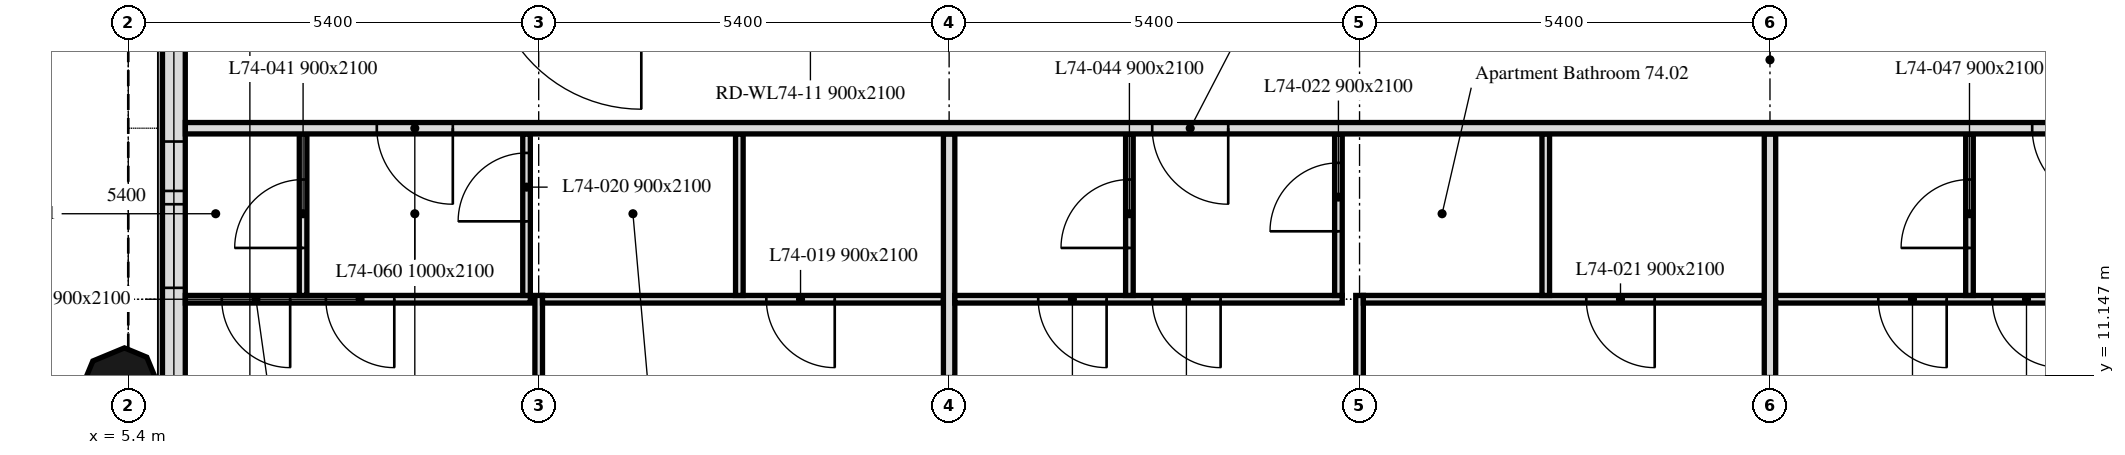
"""IFC4 building model, lengths in metres.
Left out: names, types, materials, properties, quantities, classifications, styles, units other than length and angle.
Written with IfcOpenShell. Run it as: python <this file> out.ifc"""

import sys

from ifc_helpers import new_model, si_unit, direction, frame, frame_2d, origin, place, context, subcontext, project, spatial, polyline, rectangle, outline, extrude, element, fill, save


model = new_model("IFC4")
c1 = context("Model", 3, precision=1e-05, world=origin(), true_north=direction((0.0, 1.0)))
c2 = subcontext(c1, "Body", "Model", "MODEL_VIEW")
j1 = project(units=[si_unit("LENGTHUNIT", "METRE"), si_unit("PLANEANGLEUNIT", "RADIAN")], contexts=[c1])
p1 = place(None, origin())
s1 = spatial("IfcSite", under=j1, at=p1, CompositionType="ELEMENT")
p2 = place(p1, origin())
s2 = spatial("IfcBuilding", under=s1, at=p2, CompositionType="ELEMENT")
p3 = place(p2, frame((0.0, 0.0, 298.3)))
s3 = spatial("IfcBuildingStorey", under=s2, at=p3, CompositionType="ELEMENT", Elevation=298.3)
p4 = place(p3, frame((5.4, 10.8, 0.0), z_axis=(0.0, 0.0, 1.0), x_axis=(-0.382683432365, 0.923879532511, 0.0)))
e1 = element("IfcColumn", 1, at=p4, inside=s3, PredefinedType="COLUMN", context=c2, shape_type="SweptSolid", body=[
    extrude(outline(polyline([(-0.45, -0.45), (0.45, -0.45), (0.675, -0.225), (0.675, 0.225), (0.45, 0.45), (-0.45, 0.45), (-0.675, 0.225), (-0.675, -0.225), (-0.45, -0.45)])), origin(), (0.0, 0.0, 1.0), 3.0),
])
p5 = place(p3, frame((6.0, 16.2, 0.0), z_axis=(0.0, 0.0, 1.0), x_axis=(0.0, -1.0, 0.0)))
e2 = element("IfcWall", 2, at=p5, inside=s3, PredefinedType="SOLIDWALL", context=c2, shape_type="SweptSolid", body=[
    extrude(rectangle(XDim=5.214, YDim=0.3, at=frame_2d((2.607, 0.0))), origin(), (0.0, 0.0, 1.0), 3.0),
])
p6 = place(p5, frame((1.975, 0.0, 0.9)))
e3 = element("IfcOpeningElement", 3, at=p6, cuts=e2, PredefinedType="OPENING", context=c2, shape_type="SweptSolid", body=[
    extrude(rectangle(XDim=0.65, YDim=1.7, at=frame_2d((0.325, 0.85))), frame((0.0, 0.16, 0.0), z_axis=(0.0, -1.0, 0.0), x_axis=(1.0, 0.0, 0.0)), (0.0, 0.0, 1.0), 0.32),
])
p7 = place(p5, frame((2.8, 0.0, 0.9)))
e4 = element("IfcOpeningElement", 4, at=p7, cuts=e2, PredefinedType="OPENING", context=c2, shape_type="SweptSolid", body=[
    extrude(rectangle(XDim=1.1, YDim=1.7, at=frame_2d((0.55, 0.85))), frame((0.0, 0.16, 0.0), z_axis=(0.0, -1.0, 0.0), x_axis=(1.0, 0.0, 0.0)), (0.0, 0.0, 1.0), 0.32),
])
p8 = place(p3, frame((10.8, 11.12, 0.0), z_axis=(0.0, 0.0, 1.0), x_axis=(0.0, 1.0, 0.0)))
e5 = element("IfcWall", 5, at=p8, inside=s3, PredefinedType="PARTITIONING", context=c2, shape_type="SweptSolid", body=[
    extrude(rectangle(XDim=1.08, YDim=0.1, at=frame_2d((0.54, 0.0))), origin(), (0.0, 0.0, 1.0), 3.0),
])
p9 = place(p3, frame((10.69, 12.15, 0.0), z_axis=(0.0, 0.0, 1.0), x_axis=(-1.0, 0.0, 0.0)))
e6 = element("IfcWall", 6, at=p9, inside=s3, PredefinedType="PARTITIONING", context=c2, shape_type="SweptSolid", body=[
    extrude(rectangle(XDim=4.539, YDim=0.1, at=frame_2d((2.27, 0.0))), origin(), (0.0, 0.0, 1.0), 3.0),
])
p10 = place(p9, frame((3.16, 0.0, 0.0)))
e7 = element("IfcOpeningElement", 7, at=p10, cuts=e6, PredefinedType="OPENING", context=c2, shape_type="SweptSolid", body=[
    extrude(rectangle(XDim=0.9, YDim=2.1, at=frame_2d((0.45, 1.05))), frame((0.0, 0.05, 0.0), z_axis=(0.0, -1.0, 0.0), x_axis=(1.0, 0.0, 0.0)), (0.0, 0.0, 1.0), 0.1),
])
p11 = place(p9, frame((1.79, 0.0, 0.0)))
e8 = element("IfcOpeningElement", 8, at=p11, cuts=e6, PredefinedType="OPENING", context=c2, shape_type="SweptSolid", body=[
    extrude(rectangle(XDim=0.9, YDim=2.1, at=frame_2d((0.45, 1.05))), frame((0.0, 0.05, 0.0), z_axis=(0.0, -1.0, 0.0), x_axis=(1.0, 0.0, 0.0)), (0.0, 0.0, 1.0), 0.1),
])
p12 = place(p3, frame((16.125, 12.15, 0.0), z_axis=(0.0, 0.0, 1.0), x_axis=(-1.0, 0.0, 0.0)))
e9 = element("IfcWall", 9, at=p12, inside=s3, PredefinedType="PARTITIONING", context=c2, shape_type="SweptSolid", body=[
    extrude(rectangle(XDim=5.275, YDim=0.1, at=frame_2d((2.637, 0.0))), origin(), (0.0, 0.0, 1.0), 3.0),
])
p13 = place(p12, frame((1.43, 0.0, 0.0)))
e10 = element("IfcOpeningElement", 10, at=p13, cuts=e9, PredefinedType="OPENING", context=c2, shape_type="SweptSolid", body=[
    extrude(rectangle(XDim=0.9, YDim=2.1, at=frame_2d((0.45, 1.05))), frame((0.0, 0.05, 0.0), z_axis=(0.0, -1.0, 0.0), x_axis=(1.0, 0.0, 0.0)), (0.0, 0.0, 1.0), 0.1),
])
p14 = place(p3, frame((7.7, 12.2, 0.0), z_axis=(0.0, 0.0, 1.0), x_axis=(0.0, 1.0, 0.0)))
e11 = element("IfcWall", 11, at=p14, inside=s3, PredefinedType="PARTITIONING", context=c2, shape_type="SweptSolid", body=[
    extrude(rectangle(XDim=2.125, YDim=0.1, at=frame_2d((1.062, 0.0))), origin(), (0.0, 0.0, 1.0), 3.0),
])
p15 = place(p14, frame((0.625, 0.0, 0.0)))
e12 = element("IfcOpeningElement", 12, at=p15, cuts=e11, PredefinedType="OPENING", context=c2, shape_type="SweptSolid", body=[
    extrude(rectangle(XDim=0.9, YDim=2.1, at=frame_2d((0.45, 1.05))), frame((0.0, 0.05, 0.0), z_axis=(0.0, -1.0, 0.0), x_axis=(1.0, 0.0, 0.0)), (0.0, 0.0, 1.0), 0.1),
])
p16 = place(p3, frame((10.64, 12.2, 0.0), z_axis=(0.0, 0.0, 1.0), x_axis=(0.0, 1.0, 0.0)))
e13 = element("IfcWall", 13, at=p16, inside=s3, PredefinedType="PARTITIONING", context=c2, shape_type="SweptSolid", body=[
    extrude(rectangle(XDim=2.125, YDim=0.1, at=frame_2d((1.062, 0.0))), origin(), (0.0, 0.0, 1.0), 3.0),
])
p17 = place(p16, frame((0.975, 0.0, 0.0)))
e14 = element("IfcOpeningElement", 14, at=p17, cuts=e13, PredefinedType="OPENING", context=c2, shape_type="SweptSolid", body=[
    extrude(rectangle(XDim=0.9, YDim=2.1, at=frame_2d((0.45, 1.05))), frame((0.0, 0.05, 0.0), z_axis=(0.0, -1.0, 0.0), x_axis=(1.0, 0.0, 0.0)), (0.0, 0.0, 1.0), 0.1),
])
p18 = place(p3, frame((13.44, 12.2, 0.0), z_axis=(0.0, 0.0, 1.0), x_axis=(0.0, 1.0, 0.0)))
e15 = element("IfcWall", 15, at=p18, inside=s3, PredefinedType="PARTITIONING", context=c2, shape_type="SweptSolid", body=[
    extrude(rectangle(XDim=2.125, YDim=0.1, at=frame_2d((1.062, 0.0))), origin(), (0.0, 0.0, 1.0), 3.0),
])
p19 = place(p3, frame((16.2, 11.12, 0.0), z_axis=(0.0, 0.0, 1.0), x_axis=(0.0, 1.0, 0.0)))
e16 = element("IfcWall", 16, at=p19, inside=s3, PredefinedType="PARTITIONING", context=c2, shape_type="SweptSolid", body=[
    extrude(rectangle(XDim=3.205, YDim=0.15, at=frame_2d((1.603, 0.0))), origin(), (0.0, 0.0, 1.0), 3.0),
])
p20 = place(p3, frame((21.6, 11.12, 0.0), z_axis=(0.0, 0.0, 1.0), x_axis=(0.0, 1.0, 0.0)))
e17 = element("IfcWall", 17, at=p20, inside=s3, PredefinedType="PARTITIONING", context=c2, shape_type="SweptSolid", body=[
    extrude(rectangle(XDim=1.08, YDim=0.1, at=frame_2d((0.54, 0.0))), origin(), (0.0, 0.0, 1.0), 3.0),
])
p21 = place(p3, frame((21.372, 12.15, 0.0), z_axis=(0.0, 0.0, 1.0), x_axis=(-1.0, 0.0, 0.0)))
e18 = element("IfcWall", 18, at=p21, inside=s3, PredefinedType="PARTITIONING", context=c2, shape_type="SweptSolid", body=[
    extrude(rectangle(XDim=5.097, YDim=0.1, at=frame_2d((2.549, 0.0))), origin(), (0.0, 0.0, 1.0), 3.0),
])
p22 = place(p21, frame((3.1, 0.0, 0.0)))
e19 = element("IfcOpeningElement", 19, at=p22, cuts=e18, PredefinedType="OPENING", context=c2, shape_type="SweptSolid", body=[
    extrude(rectangle(XDim=0.9, YDim=2.1, at=frame_2d((0.45, 1.05))), frame((0.0, 0.05, 0.0), z_axis=(0.0, -1.0, 0.0), x_axis=(1.0, 0.0, 0.0)), (0.0, 0.0, 1.0), 0.1),
])
p23 = place(p21, frame((1.6, 0.0, 0.0)))
e20 = element("IfcOpeningElement", 20, at=p23, cuts=e18, PredefinedType="OPENING", context=c2, shape_type="SweptSolid", body=[
    extrude(rectangle(XDim=0.9, YDim=2.1, at=frame_2d((0.45, 1.05))), frame((0.0, 0.05, 0.0), z_axis=(0.0, -1.0, 0.0), x_axis=(1.0, 0.0, 0.0)), (0.0, 0.0, 1.0), 0.1),
])
p24 = place(p3, frame((26.925, 12.15, 0.0), z_axis=(0.0, 0.0, 1.0), x_axis=(-1.0, 0.0, 0.0)))
e21 = element("IfcWall", 21, at=p24, inside=s3, PredefinedType="PARTITIONING", context=c2, shape_type="SweptSolid", body=[
    extrude(rectangle(XDim=5.275, YDim=0.1, at=frame_2d((2.638, 0.0))), origin(), (0.0, 0.0, 1.0), 3.0),
])
p25 = place(p24, frame((1.442, 0.0, 0.0)))
e22 = element("IfcOpeningElement", 22, at=p25, cuts=e21, PredefinedType="OPENING", context=c2, shape_type="SweptSolid", body=[
    extrude(rectangle(XDim=0.9, YDim=2.1, at=frame_2d((0.45, 1.05))), frame((0.0, 0.05, 0.0), z_axis=(0.0, -1.0, 0.0), x_axis=(1.0, 0.0, 0.0)), (0.0, 0.0, 1.0), 0.1),
])
p26 = place(p3, frame((18.572, 12.2, 0.0), z_axis=(0.0, 0.0, 1.0), x_axis=(0.0, 1.0, 0.0)))
e23 = element("IfcWall", 23, at=p26, inside=s3, PredefinedType="PARTITIONING", context=c2, shape_type="SweptSolid", body=[
    extrude(rectangle(XDim=2.125, YDim=0.1, at=frame_2d((1.062, 0.0))), origin(), (0.0, 0.0, 1.0), 3.0),
])
p27 = place(p26, frame((0.625, 0.0, 0.0)))
e24 = element("IfcOpeningElement", 24, at=p27, cuts=e23, PredefinedType="OPENING", context=c2, shape_type="SweptSolid", body=[
    extrude(rectangle(XDim=0.9, YDim=2.1, at=frame_2d((0.45, 1.05))), frame((0.0, 0.05, 0.0), z_axis=(0.0, -1.0, 0.0), x_axis=(1.0, 0.0, 0.0)), (0.0, 0.0, 1.0), 0.1),
])
p28 = place(p3, frame((21.322, 12.2, 0.0), z_axis=(0.0, 0.0, 1.0), x_axis=(0.0, 1.0, 0.0)))
e25 = element("IfcWall", 25, at=p28, inside=s3, PredefinedType="PARTITIONING", context=c2, shape_type="SweptSolid", body=[
    extrude(rectangle(XDim=2.125, YDim=0.1, at=frame_2d((1.062, 0.0))), origin(), (0.0, 0.0, 1.0), 3.0),
])
p29 = place(p28, frame((0.844, 0.0, 0.0)))
e26 = element("IfcOpeningElement", 26, at=p29, cuts=e25, PredefinedType="OPENING", context=c2, shape_type="SweptSolid", body=[
    extrude(rectangle(XDim=0.9, YDim=2.1, at=frame_2d((0.45, 1.05))), frame((0.0, 0.05, 0.0), z_axis=(0.0, -1.0, 0.0), x_axis=(1.0, 0.0, 0.0)), (0.0, 0.0, 1.0), 0.1),
])
p30 = place(p3, frame((24.05, 12.2, 0.0), z_axis=(0.0, 0.0, 1.0), x_axis=(0.0, 1.0, 0.0)))
e27 = element("IfcWall", 27, at=p30, inside=s3, PredefinedType="PARTITIONING", context=c2, shape_type="SweptSolid", body=[
    extrude(rectangle(XDim=2.125, YDim=0.1, at=frame_2d((1.062, 0.0))), origin(), (0.0, 0.0, 1.0), 3.0),
])
p31 = place(p3, frame((27.0, 11.12, 0.0), z_axis=(0.0, 0.0, 1.0), x_axis=(0.0, 1.0, 0.0)))
e28 = element("IfcWall", 28, at=p31, inside=s3, PredefinedType="PARTITIONING", context=c2, shape_type="SweptSolid", body=[
    extrude(rectangle(XDim=3.205, YDim=0.15, at=frame_2d((1.603, 0.0))), origin(), (0.0, 0.0, 1.0), 3.0),
])
p32 = place(p3, frame((32.325, 12.15, 0.0), z_axis=(0.0, 0.0, 1.0), x_axis=(-1.0, 0.0, 0.0)))
e29 = element("IfcWall", 29, at=p32, inside=s3, PredefinedType="PARTITIONING", context=c2, shape_type="SweptSolid", body=[
    extrude(rectangle(XDim=5.25, YDim=0.1, at=frame_2d((2.625, 0.0))), origin(), (0.0, 0.0, 1.0), 3.0),
])
p33 = place(p32, frame((3.0, 0.0, 0.0)))
e30 = element("IfcOpeningElement", 30, at=p33, cuts=e29, PredefinedType="OPENING", context=c2, shape_type="SweptSolid", body=[
    extrude(rectangle(XDim=0.9, YDim=2.1, at=frame_2d((0.45, 1.05))), frame((0.0, 0.05, 0.0), z_axis=(0.0, -1.0, 0.0), x_axis=(1.0, 0.0, 0.0)), (0.0, 0.0, 1.0), 0.1),
])
p34 = place(p32, frame((1.5, 0.0, 0.0)))
e31 = element("IfcOpeningElement", 31, at=p34, cuts=e29, PredefinedType="OPENING", context=c2, shape_type="SweptSolid", body=[
    extrude(rectangle(XDim=0.9, YDim=2.1, at=frame_2d((0.45, 1.05))), frame((0.0, 0.05, 0.0), z_axis=(0.0, -1.0, 0.0), x_axis=(1.0, 0.0, 0.0)), (0.0, 0.0, 1.0), 0.1),
])
p35 = place(p3, frame((29.625, 12.2, 0.0), z_axis=(0.0, 0.0, 1.0), x_axis=(0.0, 1.0, 0.0)))
e32 = element("IfcWall", 32, at=p35, inside=s3, PredefinedType="PARTITIONING", context=c2, shape_type="SweptSolid", body=[
    extrude(rectangle(XDim=2.125, YDim=0.1, at=frame_2d((1.062, 0.0))), origin(), (0.0, 0.0, 1.0), 3.0),
])
p36 = place(p35, frame((0.625, 0.0, 0.0)))
e33 = element("IfcOpeningElement", 33, at=p36, cuts=e32, PredefinedType="OPENING", context=c2, shape_type="SweptSolid", body=[
    extrude(rectangle(XDim=0.9, YDim=2.1, at=frame_2d((0.45, 1.05))), frame((0.0, 0.05, 0.0), z_axis=(0.0, -1.0, 0.0), x_axis=(1.0, 0.0, 0.0)), (0.0, 0.0, 1.0), 0.1),
])
p37 = place(p3, frame((47.849, 14.4, 0.0), z_axis=(0.0, 0.0, 1.0), x_axis=(-1.0, 0.0, 0.0)))
e34 = element("IfcWall", 34, at=p37, inside=s3, PredefinedType="PARTITIONING", context=c2, shape_type="SweptSolid", body=[
    extrude(rectangle(XDim=41.698, YDim=0.15, at=frame_2d((20.849, 0.0))), origin(), (0.0, 0.0, 1.0), 3.0),
])
p38 = place(p37, frame((38.179, 0.0, 0.0)))
e35 = element("IfcOpeningElement", 35, at=p38, cuts=e34, PredefinedType="OPENING", context=c2, shape_type="SweptSolid", body=[
    extrude(rectangle(XDim=1.0, YDim=2.1, at=frame_2d((0.5, 1.05))), frame((0.0, 0.075, 0.0), z_axis=(0.0, -1.0, 0.0), x_axis=(1.0, 0.0, 0.0)), (0.0, 0.0, 1.0), 0.15),
])
p39 = place(p37, frame((27.977, 0.0, 0.0)))
e36 = element("IfcOpeningElement", 36, at=p39, cuts=e34, PredefinedType="OPENING", context=c2, shape_type="SweptSolid", body=[
    extrude(rectangle(XDim=1.0, YDim=2.1, at=frame_2d((0.5, 1.05))), frame((0.0, 0.075, 0.0), z_axis=(0.0, -1.0, 0.0), x_axis=(1.0, 0.0, 0.0)), (0.0, 0.0, 1.0), 0.15),
])
p40 = place(p37, frame((16.399, 0.0, 0.0)))
e37 = element("IfcOpeningElement", 37, at=p40, cuts=e34, PredefinedType="OPENING", context=c2, shape_type="SweptSolid", body=[
    extrude(rectangle(XDim=1.0, YDim=2.1, at=frame_2d((0.5, 1.05))), frame((0.0, 0.075, 0.0), z_axis=(0.0, -1.0, 0.0), x_axis=(1.0, 0.0, 0.0)), (0.0, 0.0, 1.0), 0.15),
])
p41 = place(p37, frame((5.476, 0.0, 0.0)))
e38 = element("IfcOpeningElement", 38, at=p41, cuts=e34, PredefinedType="OPENING", context=c2, shape_type="SweptSolid", body=[
    extrude(rectangle(XDim=1.0, YDim=2.1, at=frame_2d((0.5, 1.05))), frame((0.0, 0.075, 0.0), z_axis=(0.0, -1.0, 0.0), x_axis=(1.0, 0.0, 0.0)), (0.0, 0.0, 1.0), 0.15),
])
p42 = place(p6, origin())
e39 = element("IfcWindow", 39, at=p42, inside=s3, PartitioningType="SINGLE_PANEL", PredefinedType="WINDOW", context=c2, shape_type="SweptSolid", body=[
    extrude(rectangle(XDim=0.65, YDim=1.7, at=frame_2d((0.325, 0.85))), frame((0.0, 0.03, 0.0), z_axis=(0.0, -1.0, 0.0), x_axis=(1.0, 0.0, 0.0)), (0.0, 0.0, 1.0), 0.06),
])
fill(e3, e39)
p43 = place(p7, origin())
e40 = element("IfcWindow", 40, at=p43, inside=s3, PartitioningType="SINGLE_PANEL", PredefinedType="WINDOW", context=c2, shape_type="SweptSolid", body=[
    extrude(rectangle(XDim=1.1, YDim=1.7, at=frame_2d((0.55, 0.85))), frame((0.0, 0.03, 0.0), z_axis=(0.0, -1.0, 0.0), x_axis=(1.0, 0.0, 0.0)), (0.0, 0.0, 1.0), 0.06),
])
fill(e4, e40)
p44 = place(p13, origin())
e41 = element("IfcDoor", 41, at=p44, inside=s3, OperationType="SINGLE_SWING_LEFT", PredefinedType="DOOR", context=c2, shape_type="SweptSolid", body=[
    extrude(rectangle(XDim=0.9, YDim=2.1, at=frame_2d((0.45, 1.05))), frame((0.0, 0.025, 0.0), z_axis=(0.0, -1.0, 0.0), x_axis=(1.0, 0.0, 0.0)), (0.0, 0.0, 1.0), 0.05),
])
fill(e10, e41)
p45 = place(p17, origin())
e42 = element("IfcDoor", 42, at=p45, inside=s3, OperationType="SINGLE_SWING_RIGHT", PredefinedType="DOOR", context=c2, shape_type="SweptSolid", body=[
    extrude(rectangle(XDim=0.9, YDim=2.1, at=frame_2d((0.45, 1.05))), frame((0.0, 0.025, 0.0), z_axis=(0.0, -1.0, 0.0), x_axis=(1.0, 0.0, 0.0)), (0.0, 0.0, 1.0), 0.05),
])
fill(e14, e42)
p46 = place(p25, origin())
e43 = element("IfcDoor", 43, at=p46, inside=s3, OperationType="SINGLE_SWING_LEFT", PredefinedType="DOOR", context=c2, shape_type="SweptSolid", body=[
    extrude(rectangle(XDim=0.9, YDim=2.1, at=frame_2d((0.45, 1.05))), frame((0.0, 0.025, 0.0), z_axis=(0.0, -1.0, 0.0), x_axis=(1.0, 0.0, 0.0)), (0.0, 0.0, 1.0), 0.05),
])
fill(e22, e43)
p47 = place(p29, origin())
e44 = element("IfcDoor", 44, at=p47, inside=s3, OperationType="SINGLE_SWING_LEFT", PredefinedType="DOOR", context=c2, shape_type="SweptSolid", body=[
    extrude(rectangle(XDim=0.9, YDim=2.1, at=frame_2d((0.45, 1.05))), frame((0.0, 0.025, 0.0), z_axis=(0.0, -1.0, 0.0), x_axis=(1.0, 0.0, 0.0)), (0.0, 0.0, 1.0), 0.05),
])
fill(e26, e44)
p48 = place(p10, origin())
e45 = element("IfcDoor", 45, at=p48, inside=s3, OperationType="SINGLE_SWING_RIGHT", PredefinedType="DOOR", context=c2, shape_type="SweptSolid", body=[
    extrude(rectangle(XDim=0.9, YDim=2.1, at=frame_2d((0.45, 1.05))), frame((0.0, 0.025, 0.0), z_axis=(0.0, -1.0, 0.0), x_axis=(1.0, 0.0, 0.0)), (0.0, 0.0, 1.0), 0.05),
])
fill(e7, e45)
p49 = place(p15, origin())
e46 = element("IfcDoor", 46, at=p49, inside=s3, OperationType="SINGLE_SWING_RIGHT", PredefinedType="DOOR", context=c2, shape_type="SweptSolid", body=[
    extrude(rectangle(XDim=0.9, YDim=2.1, at=frame_2d((0.45, 1.05))), frame((0.0, 0.025, 0.0), z_axis=(0.0, -1.0, 0.0), x_axis=(1.0, 0.0, 0.0)), (0.0, 0.0, 1.0), 0.05),
])
fill(e12, e46)
p50 = place(p22, origin())
e47 = element("IfcDoor", 47, at=p50, inside=s3, OperationType="SINGLE_SWING_RIGHT", PredefinedType="DOOR", context=c2, shape_type="SweptSolid", body=[
    extrude(rectangle(XDim=0.9, YDim=2.1, at=frame_2d((0.45, 1.05))), frame((0.0, 0.025, 0.0), z_axis=(0.0, -1.0, 0.0), x_axis=(1.0, 0.0, 0.0)), (0.0, 0.0, 1.0), 0.05),
])
fill(e19, e47)
p51 = place(p27, origin())
e48 = element("IfcDoor", 48, at=p51, inside=s3, OperationType="SINGLE_SWING_LEFT", PredefinedType="DOOR", context=c2, shape_type="SweptSolid", body=[
    extrude(rectangle(XDim=0.9, YDim=2.1, at=frame_2d((0.45, 1.05))), frame((0.0, 0.025, 0.0), z_axis=(0.0, -1.0, 0.0), x_axis=(1.0, 0.0, 0.0)), (0.0, 0.0, 1.0), 0.05),
])
fill(e24, e48)
p52 = place(p33, origin())
e49 = element("IfcDoor", 49, at=p52, inside=s3, OperationType="SINGLE_SWING_RIGHT", PredefinedType="DOOR", context=c2, shape_type="SweptSolid", body=[
    extrude(rectangle(XDim=0.9, YDim=2.1, at=frame_2d((0.45, 1.05))), frame((0.0, 0.025, 0.0), z_axis=(0.0, -1.0, 0.0), x_axis=(1.0, 0.0, 0.0)), (0.0, 0.0, 1.0), 0.05),
])
fill(e30, e49)
p53 = place(p36, origin())
e50 = element("IfcDoor", 50, at=p53, inside=s3, OperationType="SINGLE_SWING_RIGHT", PredefinedType="DOOR", context=c2, shape_type="SweptSolid", body=[
    extrude(rectangle(XDim=0.9, YDim=2.1, at=frame_2d((0.45, 1.05))), frame((0.0, 0.025, 0.0), z_axis=(0.0, -1.0, 0.0), x_axis=(1.0, 0.0, 0.0)), (0.0, 0.0, 1.0), 0.05),
])
fill(e33, e50)
p54 = place(p11, origin())
e51 = element("IfcDoor", 51, at=p54, inside=s3, OperationType="SINGLE_SWING_LEFT", PredefinedType="DOOR", context=c2, shape_type="SweptSolid", body=[
    extrude(rectangle(XDim=0.9, YDim=2.1, at=frame_2d((0.45, 1.05))), frame((0.0, 0.025, 0.0), z_axis=(0.0, -1.0, 0.0), x_axis=(1.0, 0.0, 0.0)), (0.0, 0.0, 1.0), 0.05),
])
fill(e8, e51)
p55 = place(p23, origin())
e52 = element("IfcDoor", 52, at=p55, inside=s3, OperationType="SINGLE_SWING_LEFT", PredefinedType="DOOR", context=c2, shape_type="SweptSolid", body=[
    extrude(rectangle(XDim=0.9, YDim=2.1, at=frame_2d((0.45, 1.05))), frame((0.0, 0.025, 0.0), z_axis=(0.0, -1.0, 0.0), x_axis=(1.0, 0.0, 0.0)), (0.0, 0.0, 1.0), 0.05),
])
fill(e20, e52)
p56 = place(p34, origin())
e53 = element("IfcDoor", 53, at=p56, inside=s3, OperationType="SINGLE_SWING_LEFT", PredefinedType="DOOR", context=c2, shape_type="SweptSolid", body=[
    extrude(rectangle(XDim=0.9, YDim=2.1, at=frame_2d((0.45, 1.05))), frame((0.0, 0.025, 0.0), z_axis=(0.0, -1.0, 0.0), x_axis=(1.0, 0.0, 0.0)), (0.0, 0.0, 1.0), 0.05),
])
fill(e31, e53)
p57 = place(p38, origin())
e54 = element("IfcDoor", 54, at=p57, inside=s3, OperationType="SINGLE_SWING_RIGHT", PredefinedType="DOOR", context=c2, shape_type="SweptSolid", body=[
    extrude(rectangle(XDim=1.0, YDim=2.1, at=frame_2d((0.5, 1.05))), frame((0.0, 0.025, 0.0), z_axis=(0.0, -1.0, 0.0), x_axis=(1.0, 0.0, 0.0)), (0.0, 0.0, 1.0), 0.05),
])
fill(e35, e54)
p58 = place(p39, origin())
e55 = element("IfcDoor", 55, at=p58, inside=s3, OperationType="SINGLE_SWING_RIGHT", PredefinedType="DOOR", context=c2, shape_type="SweptSolid", body=[
    extrude(rectangle(XDim=1.0, YDim=2.1, at=frame_2d((0.5, 1.05))), frame((0.0, 0.025, 0.0), z_axis=(0.0, -1.0, 0.0), x_axis=(1.0, 0.0, 0.0)), (0.0, 0.0, 1.0), 0.05),
])
fill(e36, e55)
p59 = place(p40, origin())
e56 = element("IfcDoor", 56, at=p59, inside=s3, OperationType="SINGLE_SWING_LEFT", PredefinedType="DOOR", context=c2, shape_type="SweptSolid", body=[
    extrude(rectangle(XDim=1.0, YDim=2.1, at=frame_2d((0.5, 1.05))), frame((0.0, 0.025, 0.0), z_axis=(0.0, -1.0, 0.0), x_axis=(1.0, 0.0, 0.0)), (0.0, 0.0, 1.0), 0.05),
])
fill(e37, e56)
save(model, sys.argv[1])
